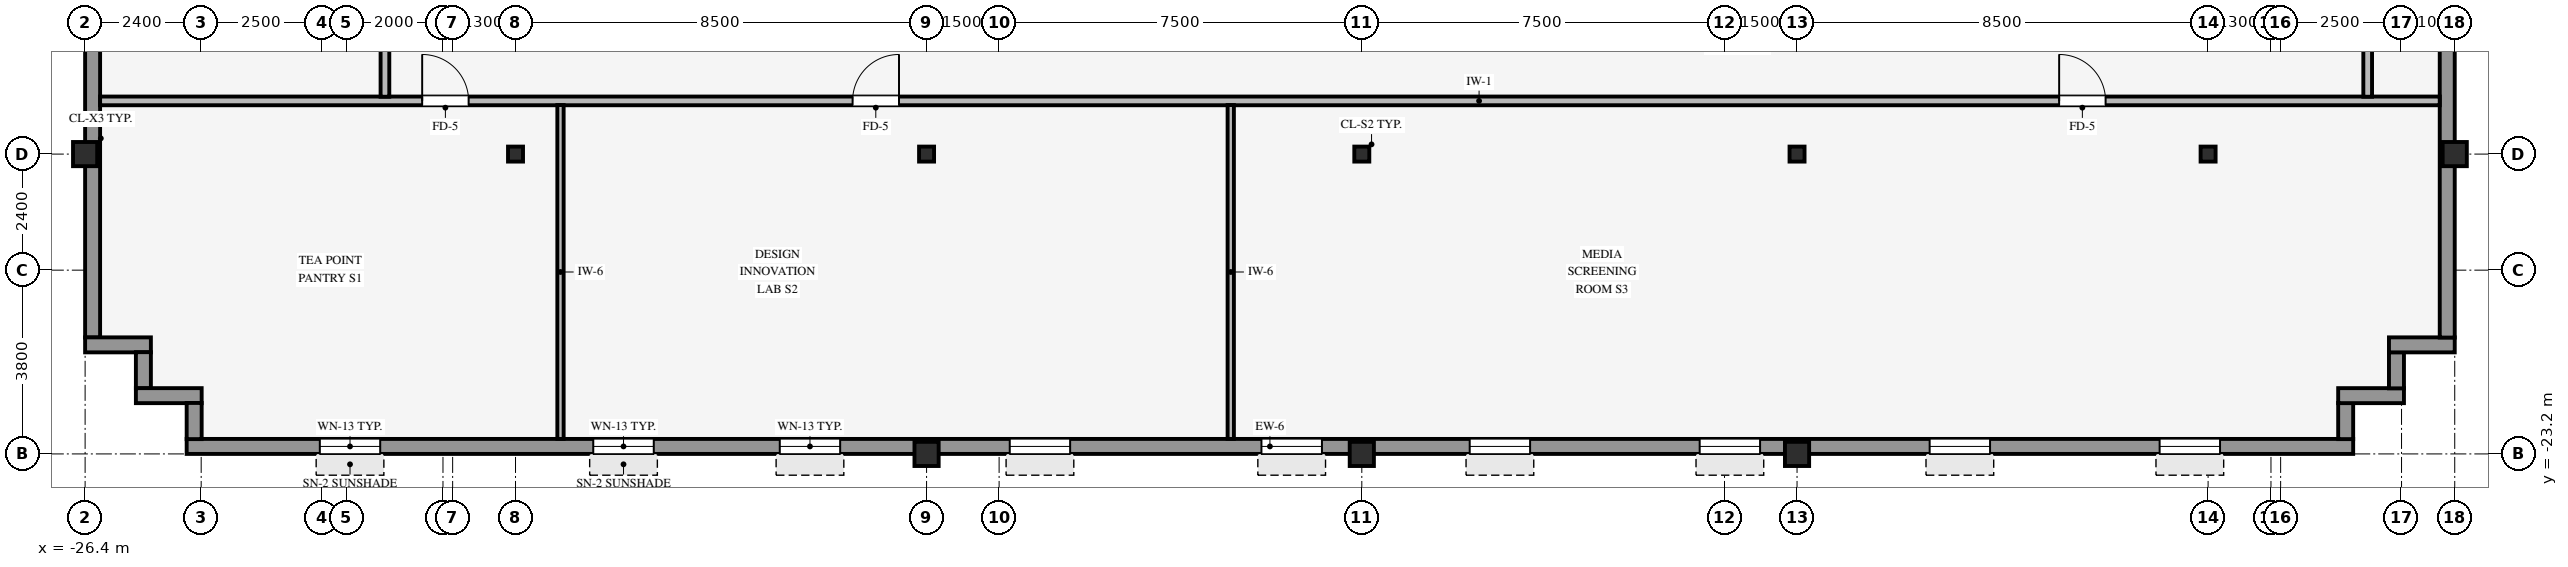
"""IFC4 building model, lengths in metres.
Left out: names, types, materials, properties, quantities, classifications, styles, units other than length and angle.
Written with IfcOpenShell. Run it as: python <this file> out.ifc"""

import sys

from ifc_helpers import new_model, si_unit, direction, frame, frame_2d, origin, origin_2d, place, context, subcontext, project, spatial, rectangle, hollow_rectangle, i_section, extrude, source, transform, mapped, element, fill, save


model = new_model("IFC4")
c1 = context("Model", 3, precision=1e-05, world=origin(), true_north=direction((0.0, 1.0)))
c2 = subcontext(c1, "Body", "Model", "MODEL_VIEW")
j1 = project(units=[si_unit("LENGTHUNIT", "METRE"), si_unit("PLANEANGLEUNIT", "RADIAN")], contexts=[c1])
p1 = place(None, origin())
s1 = spatial("IfcSite", under=j1, at=p1, CompositionType="ELEMENT")
p2 = place(p1, origin())
s2 = spatial("IfcBuilding", under=s1, at=p2, CompositionType="ELEMENT")
p3 = place(p2, frame((0.0, 0.0, 201.85)))
s3 = spatial("IfcBuildingStorey", under=s2, at=p3, CompositionType="ELEMENT", Elevation=201.85)
for number, where, z_axis, x_axis in (
    (1, (-26.4, -17.0, 0.0), (0.0, 0.0, 1.0), (1.0, 0.0, 0.0)),
    (2, (22.6, -17.0, 0.0), (0.0, 0.0, 1.0), (1.0, 0.0, 0.0)),
    (3, (-9.0, -23.2, 0.0), (0.0, 0.0, 1.0), (1.0, 0.0, 0.0)),
    (4, (0.0, -23.2, 0.0), (0.0, 0.0, 1.0), (1.0, 0.0, 0.0)),
    (5, (9.0, -23.2, 0.0), (0.0, 0.0, 1.0), (1.0, 0.0, 0.0)),
):
    element("IfcColumn", number, at=place(p3, frame(where, z_axis=z_axis, x_axis=x_axis)), inside=s3, PredefinedType="COLUMN", context=c2, shape_type="SweptSolid", body=[
        extrude(hollow_rectangle(XDim=0.5, YDim=0.5, WallThickness=0.032, InnerFilletRadius=0.032, OuterFilletRadius=0.064, at=origin_2d()), origin(), (0.0, 0.0, 1.0), 3.37),
    ])
for number, where, z_axis, x_axis in (
    (6, (0.0, -17.0, 0.0), (0.0, 0.0, 1.0), (1.0, 0.0, 0.0)),
    (7, (-17.5, -17.0, 0.0), (0.0, 0.0, 1.0), (1.0, 0.0, 0.0)),
    (8, (-9.0, -17.0, 0.0), (0.0, 0.0, 1.0), (1.0, 0.0, 0.0)),
    (9, (9.0, -17.0, 0.0), (0.0, 0.0, 1.0), (1.0, 0.0, 0.0)),
    (10, (17.5, -17.0, 0.0), (0.0, 0.0, 1.0), (1.0, 0.0, 0.0)),
):
    element("IfcColumn", number, at=place(p3, frame(where, z_axis=z_axis, x_axis=x_axis)), inside=s3, PredefinedType="COLUMN", context=c2, shape_type="SweptSolid", body=[
        extrude(i_section(OverallWidth=0.31, OverallDepth=0.31, WebThickness=0.015, FlangeThickness=0.015, FilletRadius=0.015, at=origin_2d()), origin(), (0.0, 0.0, 1.0), 3.37),
    ])
p4 = place(p3, frame((-24.3, -23.045, 0.0), z_axis=(0.0, 0.0, 1.0), x_axis=(1.0, 0.0, 0.0)))
e11 = element("IfcWall", 11, at=p4, inside=s3, PredefinedType="STANDARD", context=c2, shape_type="SweptSolid", body=[
    extrude(rectangle(XDim=44.8, YDim=0.31, at=frame_2d((22.4, 0.0))), origin(), (0.0, 0.0, 1.0), 2.705),
])
p5 = place(p4, frame((2.753, 0.0, 0.8)))
e12 = element("IfcOpeningElement", 12, at=p5, cuts=e11, PredefinedType="OPENING", context=c2, shape_type="SweptSolid", body=[
    extrude(rectangle(XDim=1.25, YDim=1.52, at=frame_2d((0.625, 0.76))), frame((0.0, 0.165, 0.0), z_axis=(0.0, -1.0, 0.0), x_axis=(1.0, 0.0, 0.0)), (0.0, 0.0, 1.0), 0.33),
])
p6 = place(p4, frame((8.408, 0.0, 0.8)))
e13 = element("IfcOpeningElement", 13, at=p6, cuts=e11, PredefinedType="OPENING", context=c2, shape_type="SweptSolid", body=[
    extrude(rectangle(XDim=1.25, YDim=1.52, at=frame_2d((0.625, 0.76))), frame((0.0, 0.165, 0.0), z_axis=(0.0, -1.0, 0.0), x_axis=(1.0, 0.0, 0.0)), (0.0, 0.0, 1.0), 0.33),
])
p7 = place(p4, frame((12.264, 0.0, 0.8)))
e14 = element("IfcOpeningElement", 14, at=p7, cuts=e11, PredefinedType="OPENING", context=c2, shape_type="SweptSolid", body=[
    extrude(rectangle(XDim=1.25, YDim=1.52, at=frame_2d((0.625, 0.76))), frame((0.0, 0.165, 0.0), z_axis=(0.0, -1.0, 0.0), x_axis=(1.0, 0.0, 0.0)), (0.0, 0.0, 1.0), 0.33),
])
p8 = place(p4, frame((17.019, 0.0, 0.8)))
e15 = element("IfcOpeningElement", 15, at=p8, cuts=e11, PredefinedType="OPENING", context=c2, shape_type="SweptSolid", body=[
    extrude(rectangle(XDim=1.25, YDim=1.52, at=frame_2d((0.625, 0.76))), frame((0.0, 0.165, 0.0), z_axis=(0.0, -1.0, 0.0), x_axis=(1.0, 0.0, 0.0)), (0.0, 0.0, 1.0), 0.33),
])
p9 = place(p4, frame((22.225, 0.0, 0.8)))
e16 = element("IfcOpeningElement", 16, at=p9, cuts=e11, PredefinedType="OPENING", context=c2, shape_type="SweptSolid", body=[
    extrude(rectangle(XDim=1.25, YDim=1.52, at=frame_2d((0.625, 0.76))), frame((0.0, 0.165, 0.0), z_axis=(0.0, -1.0, 0.0), x_axis=(1.0, 0.0, 0.0)), (0.0, 0.0, 1.0), 0.33),
])
p10 = place(p4, frame((26.531, 0.0, 0.8)))
e17 = element("IfcOpeningElement", 17, at=p10, cuts=e11, PredefinedType="OPENING", context=c2, shape_type="SweptSolid", body=[
    extrude(rectangle(XDim=1.25, YDim=1.52, at=frame_2d((0.625, 0.76))), frame((0.0, 0.165, 0.0), z_axis=(0.0, -1.0, 0.0), x_axis=(1.0, 0.0, 0.0)), (0.0, 0.0, 1.0), 0.33),
])
p11 = place(p4, frame((31.286, 0.0, 0.8)))
e18 = element("IfcOpeningElement", 18, at=p11, cuts=e11, PredefinedType="OPENING", context=c2, shape_type="SweptSolid", body=[
    extrude(rectangle(XDim=1.25, YDim=1.52, at=frame_2d((0.625, 0.76))), frame((0.0, 0.165, 0.0), z_axis=(0.0, -1.0, 0.0), x_axis=(1.0, 0.0, 0.0)), (0.0, 0.0, 1.0), 0.33),
])
p12 = place(p4, frame((36.042, 0.0, 0.8)))
e19 = element("IfcOpeningElement", 19, at=p12, cuts=e11, PredefinedType="OPENING", context=c2, shape_type="SweptSolid", body=[
    extrude(rectangle(XDim=1.25, YDim=1.52, at=frame_2d((0.625, 0.76))), frame((0.0, 0.165, 0.0), z_axis=(0.0, -1.0, 0.0), x_axis=(1.0, 0.0, 0.0)), (0.0, 0.0, 1.0), 0.33),
])
p13 = place(p4, frame((40.797, 0.0, 0.8)))
e20 = element("IfcOpeningElement", 20, at=p13, cuts=e11, PredefinedType="OPENING", context=c2, shape_type="SweptSolid", body=[
    extrude(rectangle(XDim=1.25, YDim=1.52, at=frame_2d((0.625, 0.76))), frame((0.0, 0.165, 0.0), z_axis=(0.0, -1.0, 0.0), x_axis=(1.0, 0.0, 0.0)), (0.0, 0.0, 1.0), 0.33),
])
p14 = place(p3, frame((20.345, -22.894, 0.0), z_axis=(0.0, 0.0, 1.0), x_axis=(0.0, 1.0, 0.0)))
e21 = element("IfcWall", 21, at=p14, inside=s3, PredefinedType="STANDARD", context=c2, shape_type="SweptSolid", body=[
    extrude(rectangle(XDim=0.748, YDim=0.31, at=frame_2d((0.374, 0.0))), origin(), (0.0, 0.0, 1.0), 3.36),
])
p15 = place(p3, frame((20.19, -21.995, 0.0), z_axis=(0.0, 0.0, 1.0), x_axis=(1.0, 0.0, 0.0)))
e22 = element("IfcWall", 22, at=p15, inside=s3, PredefinedType="STANDARD", context=c2, shape_type="SweptSolid", body=[
    extrude(rectangle(XDim=1.36, YDim=0.31, at=frame_2d((0.68, 0.0))), origin(), (0.0, 0.0, 1.0), 3.36),
])
p16 = place(p3, frame((21.395, -21.844, 0.0), z_axis=(0.0, 0.0, 1.0), x_axis=(0.0, 1.0, 0.0)))
e23 = element("IfcWall", 23, at=p16, inside=s3, PredefinedType="STANDARD", context=c2, shape_type="SweptSolid", body=[
    extrude(rectangle(XDim=0.748, YDim=0.31, at=frame_2d((0.374, 0.0))), origin(), (0.0, 0.0, 1.0), 3.36),
])
p17 = place(p3, frame((21.24, -20.945, 0.0), z_axis=(0.0, 0.0, 1.0), x_axis=(1.0, 0.0, 0.0)))
e24 = element("IfcWall", 24, at=p17, inside=s3, PredefinedType="STANDARD", context=c2, shape_type="SweptSolid", body=[
    extrude(rectangle(XDim=1.36, YDim=0.31, at=frame_2d((0.68, 0.0))), origin(), (0.0, 0.0, 1.0), 3.36),
])
p18 = place(p3, frame((22.445, -20.794, 0.0), z_axis=(0.0, 0.0, 1.0), x_axis=(0.0, 1.0, 0.0)))
e25 = element("IfcWall", 25, at=p18, inside=s3, PredefinedType="STANDARD", context=c2, shape_type="SweptSolid", body=[
    extrude(rectangle(XDim=37.788, YDim=0.31, at=frame_2d((18.894, 0.0))), origin(), (0.0, 0.0, 1.0), 2.705),
])
p19 = place(p18, frame((16.444, 0.0, 0.0), z_axis=(0.0, 0.0, 1.0), x_axis=(-1.0, 0.0, 0.0)))
e26 = element("IfcOpeningElement", 26, at=p19, cuts=e25, PredefinedType="OPENING", context=c2, shape_type="SweptSolid", body=[
    extrude(rectangle(XDim=1.05, YDim=2.1, at=frame_2d((0.525, 1.05))), frame((0.0, 0.165, 0.0), z_axis=(0.0, -1.0, 0.0), x_axis=(1.0, 0.0, 0.0)), (0.0, 0.0, 1.0), 0.33),
])
p20 = place(p18, frame((7.644, 0.0, 0.8)))
e27 = element("IfcOpeningElement", 27, at=p20, cuts=e25, PredefinedType="OPENING", context=c2, shape_type="SweptSolid", body=[
    extrude(rectangle(XDim=2.05, YDim=1.52, at=frame_2d((1.025, 0.76))), frame((0.0, 0.165, 0.0), z_axis=(0.0, -1.0, 0.0), x_axis=(1.0, 0.0, 0.0)), (0.0, 0.0, 1.0), 0.33),
])
p21 = place(p18, frame((12.756, 0.0, 0.8)))
e28 = element("IfcOpeningElement", 28, at=p21, cuts=e25, PredefinedType="OPENING", context=c2, shape_type="SweptSolid", body=[
    extrude(rectangle(XDim=2.05, YDim=1.52, at=frame_2d((1.025, 0.76))), frame((0.0, 0.165, 0.0), z_axis=(0.0, -1.0, 0.0), x_axis=(1.0, 0.0, 0.0)), (0.0, 0.0, 1.0), 0.33),
])
p22 = place(p18, frame((17.869, 0.0, 0.8)))
e29 = element("IfcOpeningElement", 29, at=p22, cuts=e25, PredefinedType="OPENING", context=c2, shape_type="SweptSolid", body=[
    extrude(rectangle(XDim=2.05, YDim=1.52, at=frame_2d((1.025, 0.76))), frame((0.0, 0.165, 0.0), z_axis=(0.0, -1.0, 0.0), x_axis=(1.0, 0.0, 0.0)), (0.0, 0.0, 1.0), 0.33),
])
p23 = place(p18, frame((22.982, 0.0, 0.8)))
e30 = element("IfcOpeningElement", 30, at=p23, cuts=e25, PredefinedType="OPENING", context=c2, shape_type="SweptSolid", body=[
    extrude(rectangle(XDim=2.05, YDim=1.52, at=frame_2d((1.025, 0.76))), frame((0.0, 0.165, 0.0), z_axis=(0.0, -1.0, 0.0), x_axis=(1.0, 0.0, 0.0)), (0.0, 0.0, 1.0), 0.33),
])
p24 = place(p18, frame((27.194, 0.0, 0.8)))
e31 = element("IfcOpeningElement", 31, at=p24, cuts=e25, PredefinedType="OPENING", context=c2, shape_type="SweptSolid", body=[
    extrude(rectangle(XDim=2.05, YDim=1.52, at=frame_2d((1.025, 0.76))), frame((0.0, 0.165, 0.0), z_axis=(0.0, -1.0, 0.0), x_axis=(1.0, 0.0, 0.0)), (0.0, 0.0, 1.0), 0.33),
])
p25 = place(p18, frame((33.207, 0.0, 0.8)))
e32 = element("IfcOpeningElement", 32, at=p25, cuts=e25, PredefinedType="OPENING", context=c2, shape_type="SweptSolid", body=[
    extrude(rectangle(XDim=2.05, YDim=1.52, at=frame_2d((1.025, 0.76))), frame((0.0, 0.165, 0.0), z_axis=(0.0, -1.0, 0.0), x_axis=(1.0, 0.0, 0.0)), (0.0, 0.0, 1.0), 0.33),
])
p26 = place(p3, frame((-26.245, -20.794, 0.0), z_axis=(0.0, 0.0, 1.0), x_axis=(0.0, 1.0, 0.0)))
e33 = element("IfcWall", 33, at=p26, inside=s3, PredefinedType="STANDARD", context=c2, shape_type="SweptSolid", body=[
    extrude(rectangle(XDim=37.788, YDim=0.31, at=frame_2d((18.894, 0.0))), origin(), (0.0, 0.0, 1.0), 2.705),
])
p27 = place(p26, frame((7.644, 0.0, 0.8)))
e34 = element("IfcOpeningElement", 34, at=p27, cuts=e33, PredefinedType="OPENING", context=c2, shape_type="SweptSolid", body=[
    extrude(rectangle(XDim=2.05, YDim=1.52, at=frame_2d((1.025, 0.76))), frame((0.0, 0.165, 0.0), z_axis=(0.0, -1.0, 0.0), x_axis=(1.0, 0.0, 0.0)), (0.0, 0.0, 1.0), 0.33),
])
p28 = place(p26, frame((13.206, 0.0, 0.8)))
e35 = element("IfcOpeningElement", 35, at=p28, cuts=e33, PredefinedType="OPENING", context=c2, shape_type="SweptSolid", body=[
    extrude(rectangle(XDim=2.05, YDim=1.52, at=frame_2d((1.025, 0.76))), frame((0.0, 0.165, 0.0), z_axis=(0.0, -1.0, 0.0), x_axis=(1.0, 0.0, 0.0)), (0.0, 0.0, 1.0), 0.33),
])
p29 = place(p26, frame((17.869, 0.0, 0.8)))
e36 = element("IfcOpeningElement", 36, at=p29, cuts=e33, PredefinedType="OPENING", context=c2, shape_type="SweptSolid", body=[
    extrude(rectangle(XDim=2.05, YDim=1.52, at=frame_2d((1.025, 0.76))), frame((0.0, 0.165, 0.0), z_axis=(0.0, -1.0, 0.0), x_axis=(1.0, 0.0, 0.0)), (0.0, 0.0, 1.0), 0.33),
])
p30 = place(p26, frame((22.982, 0.0, 0.8)))
e37 = element("IfcOpeningElement", 37, at=p30, cuts=e33, PredefinedType="OPENING", context=c2, shape_type="SweptSolid", body=[
    extrude(rectangle(XDim=2.05, YDim=1.52, at=frame_2d((1.025, 0.76))), frame((0.0, 0.165, 0.0), z_axis=(0.0, -1.0, 0.0), x_axis=(1.0, 0.0, 0.0)), (0.0, 0.0, 1.0), 0.33),
])
p31 = place(p26, frame((33.207, 0.0, 0.8)))
e38 = element("IfcOpeningElement", 38, at=p31, cuts=e33, PredefinedType="OPENING", context=c2, shape_type="SweptSolid", body=[
    extrude(rectangle(XDim=2.05, YDim=1.52, at=frame_2d((1.025, 0.76))), frame((0.0, 0.165, 0.0), z_axis=(0.0, -1.0, 0.0), x_axis=(1.0, 0.0, 0.0)), (0.0, 0.0, 1.0), 0.33),
])
p32 = place(p3, frame((-26.4, -20.945, 0.0), z_axis=(0.0, 0.0, 1.0), x_axis=(1.0, 0.0, 0.0)))
e39 = element("IfcWall", 39, at=p32, inside=s3, PredefinedType="STANDARD", context=c2, shape_type="SweptSolid", body=[
    extrude(rectangle(XDim=1.36, YDim=0.31, at=frame_2d((0.68, 0.0))), origin(), (0.0, 0.0, 1.0), 3.36),
])
p33 = place(p3, frame((-25.195, -21.844, 0.0), z_axis=(0.0, 0.0, 1.0), x_axis=(0.0, 1.0, 0.0)))
e40 = element("IfcWall", 40, at=p33, inside=s3, PredefinedType="STANDARD", context=c2, shape_type="SweptSolid", body=[
    extrude(rectangle(XDim=0.748, YDim=0.31, at=frame_2d((0.374, 0.0))), origin(), (0.0, 0.0, 1.0), 3.36),
])
p34 = place(p3, frame((-25.35, -21.995, 0.0), z_axis=(0.0, 0.0, 1.0), x_axis=(1.0, 0.0, 0.0)))
e41 = element("IfcWall", 41, at=p34, inside=s3, PredefinedType="STANDARD", context=c2, shape_type="SweptSolid", body=[
    extrude(rectangle(XDim=1.36, YDim=0.31, at=frame_2d((0.68, 0.0))), origin(), (0.0, 0.0, 1.0), 3.36),
])
p35 = place(p3, frame((-24.145, -22.894, 0.0), z_axis=(0.0, 0.0, 1.0), x_axis=(0.0, 1.0, 0.0)))
e42 = element("IfcWall", 42, at=p35, inside=s3, PredefinedType="STANDARD", context=c2, shape_type="SweptSolid", body=[
    extrude(rectangle(XDim=0.748, YDim=0.31, at=frame_2d((0.374, 0.0))), origin(), (0.0, 0.0, 1.0), 3.36),
])
p36 = place(p3, frame((-26.09, -15.9, 0.0), z_axis=(0.0, 0.0, 1.0), x_axis=(1.0, 0.0, 0.0)))
e43 = element("IfcWall", 43, at=p36, inside=s3, PredefinedType="PARTITIONING", context=c2, shape_type="SweptSolid", body=[
    extrude(rectangle(XDim=48.38, YDim=0.18, at=frame_2d((24.19, 0.0))), origin(), (0.0, 0.0, 1.0), 3.36),
])
p37 = place(p36, frame((15.56, 0.0, 0.0)))
e44 = element("IfcOpeningElement", 44, at=p37, cuts=e43, PredefinedType="OPENING", context=c2, shape_type="SweptSolid", body=[
    extrude(rectangle(XDim=0.96, YDim=2.1, at=frame_2d((0.48, 1.05))), frame((0.0, 0.1, 0.0), z_axis=(0.0, -1.0, 0.0), x_axis=(1.0, 0.0, 0.0)), (0.0, 0.0, 1.0), 0.2),
])
p38 = place(p36, frame((40.51, 0.0, 0.0)))
e45 = element("IfcOpeningElement", 45, at=p38, cuts=e43, PredefinedType="OPENING", context=c2, shape_type="SweptSolid", body=[
    extrude(rectangle(XDim=0.96, YDim=2.1, at=frame_2d((0.48, 1.05))), frame((0.0, 0.1, 0.0), z_axis=(0.0, -1.0, 0.0), x_axis=(1.0, 0.0, 0.0)), (0.0, 0.0, 1.0), 0.2),
])
p39 = place(p36, frame((6.66, 0.0, 0.0)))
e46 = element("IfcOpeningElement", 46, at=p39, cuts=e43, PredefinedType="OPENING", context=c2, shape_type="SweptSolid", body=[
    extrude(rectangle(XDim=0.96, YDim=2.1, at=frame_2d((0.48, 1.05))), frame((0.0, 0.1, 0.0), z_axis=(0.0, -1.0, 0.0), x_axis=(1.0, 0.0, 0.0)), (0.0, 0.0, 1.0), 0.2),
])
p40 = place(p3, frame((-20.2, -15.814, 0.0), z_axis=(0.0, 0.0, 1.0), x_axis=(0.0, 1.0, 0.0)))
e47 = element("IfcWall", 47, at=p40, inside=s3, PredefinedType="PARTITIONING", context=c2, shape_type="SweptSolid", body=[
    extrude(rectangle(XDim=31.628, YDim=0.18, at=frame_2d((15.814, 0.0))), origin(), (0.0, 0.0, 1.0), 3.36),
])
p41 = place(p40, frame((11.434, 0.0, 0.0)))
e48 = element("IfcOpeningElement", 48, at=p41, cuts=e47, PredefinedType="OPENING", context=c2, shape_type="SweptSolid", body=[
    extrude(rectangle(XDim=0.96, YDim=2.1, at=frame_2d((0.48, 1.05))), frame((0.0, 0.1, 0.0), z_axis=(0.0, -1.0, 0.0), x_axis=(1.0, 0.0, 0.0)), (0.0, 0.0, 1.0), 0.2),
])
p42 = place(p40, frame((19.634, 0.0, 0.0)))
e49 = element("IfcOpeningElement", 49, at=p42, cuts=e47, PredefinedType="OPENING", context=c2, shape_type="SweptSolid", body=[
    extrude(rectangle(XDim=0.96, YDim=2.1, at=frame_2d((0.48, 1.05))), frame((0.0, 0.1, 0.0), z_axis=(0.0, -1.0, 0.0), x_axis=(1.0, 0.0, 0.0)), (0.0, 0.0, 1.0), 0.2),
])
p43 = place(p40, frame((4.484, 0.0, 0.0)))
e50 = element("IfcOpeningElement", 50, at=p43, cuts=e47, PredefinedType="OPENING", context=c2, shape_type="SweptSolid", body=[
    extrude(rectangle(XDim=0.96, YDim=2.1, at=frame_2d((0.48, 1.05))), frame((0.0, 0.1, 0.0), z_axis=(0.0, -1.0, 0.0), x_axis=(1.0, 0.0, 0.0)), (0.0, 0.0, 1.0), 0.2),
])
p44 = place(p40, frame((26.184, 0.0, 0.0)))
e51 = element("IfcOpeningElement", 51, at=p44, cuts=e47, PredefinedType="OPENING", context=c2, shape_type="SweptSolid", body=[
    extrude(rectangle(XDim=0.96, YDim=2.1, at=frame_2d((0.48, 1.05))), frame((0.0, 0.1, 0.0), z_axis=(0.0, -1.0, 0.0), x_axis=(1.0, 0.0, 0.0)), (0.0, 0.0, 1.0), 0.2),
])
for number, where, z_axis, x_axis in (
    (52, (-16.57, -22.89, 0.0), (0.0, 0.0, 1.0), (0.0, 1.0, 0.0)),
    (53, (-2.71, -22.89, 0.0), (0.0, 0.0, 1.0), (0.0, 1.0, 0.0)),
):
    element("IfcWall", number, at=place(p3, frame(where, z_axis=z_axis, x_axis=x_axis)), inside=s3, PredefinedType="PARTITIONING", context=c2, shape_type="SweptSolid", body=[
        extrude(rectangle(XDim=6.904, YDim=0.13, at=frame_2d((3.452, 0.0))), origin(), (0.0, 0.0, 1.0), 3.36),
    ])
p45 = place(p3, frame((20.8, -15.814, 0.0), z_axis=(0.0, 0.0, 1.0), x_axis=(0.0, 1.0, 0.0)))
e54 = element("IfcWall", 54, at=p45, inside=s3, PredefinedType="PARTITIONING", context=c2, shape_type="SweptSolid", body=[
    extrude(rectangle(XDim=2.228, YDim=0.18, at=frame_2d((1.114, 0.0))), origin(), (0.0, 0.0, 1.0), 3.36),
])
m1 = source(origin(), c2, "Body", "SweptSolid", [
    extrude(rectangle(XDim=1.25, YDim=1.52, at=frame_2d((0.625, 0.76))), frame((0.0, 0.03, 0.0), z_axis=(0.0, -1.0, 0.0), x_axis=(1.0, 0.0, 0.0)), (0.0, 0.0, 1.0), 0.06),
])
p46 = place(p5, origin())
e55 = element("IfcWindow", 55, at=p46, inside=s3, PartitioningType="SINGLE_PANEL", PredefinedType="WINDOW", context=c2, shape_type="MappedRepresentation", body=[
    mapped(m1, transform((0.0, 0.0, 0.0), scale=1.0)),
])
fill(e12, e55)
p47 = place(p6, origin())
e56 = element("IfcWindow", 56, at=p47, inside=s3, PartitioningType="SINGLE_PANEL", PredefinedType="WINDOW", context=c2, shape_type="MappedRepresentation", body=[
    mapped(m1, transform((0.0, 0.0, 0.0), scale=1.0)),
])
fill(e13, e56)
p48 = place(p7, origin())
e57 = element("IfcWindow", 57, at=p48, inside=s3, PartitioningType="SINGLE_PANEL", PredefinedType="WINDOW", context=c2, shape_type="MappedRepresentation", body=[
    mapped(m1, transform((0.0, 0.0, 0.0), scale=1.0)),
])
fill(e14, e57)
p49 = place(p8, origin())
e58 = element("IfcWindow", 58, at=p49, inside=s3, PartitioningType="SINGLE_PANEL", PredefinedType="WINDOW", context=c2, shape_type="MappedRepresentation", body=[
    mapped(m1, transform((0.0, 0.0, 0.0), scale=1.0)),
])
fill(e15, e58)
p50 = place(p9, origin())
e59 = element("IfcWindow", 59, at=p50, inside=s3, PartitioningType="SINGLE_PANEL", PredefinedType="WINDOW", context=c2, shape_type="MappedRepresentation", body=[
    mapped(m1, transform((0.0, 0.0, 0.0), scale=1.0)),
])
fill(e16, e59)
p51 = place(p10, origin())
e60 = element("IfcWindow", 60, at=p51, inside=s3, PartitioningType="SINGLE_PANEL", PredefinedType="WINDOW", context=c2, shape_type="MappedRepresentation", body=[
    mapped(m1, transform((0.0, 0.0, 0.0), scale=1.0)),
])
fill(e17, e60)
p52 = place(p11, origin())
e61 = element("IfcWindow", 61, at=p52, inside=s3, PartitioningType="SINGLE_PANEL", PredefinedType="WINDOW", context=c2, shape_type="MappedRepresentation", body=[
    mapped(m1, transform((0.0, 0.0, 0.0), scale=1.0)),
])
fill(e18, e61)
p53 = place(p12, origin())
e62 = element("IfcWindow", 62, at=p53, inside=s3, PartitioningType="SINGLE_PANEL", PredefinedType="WINDOW", context=c2, shape_type="MappedRepresentation", body=[
    mapped(m1, transform((0.0, 0.0, 0.0), scale=1.0)),
])
fill(e19, e62)
p54 = place(p13, origin())
e63 = element("IfcWindow", 63, at=p54, inside=s3, PartitioningType="SINGLE_PANEL", PredefinedType="WINDOW", context=c2, shape_type="MappedRepresentation", body=[
    mapped(m1, transform((0.0, 0.0, 0.0), scale=1.0)),
])
fill(e20, e63)
m2 = source(origin(), c2, "Body", "SweptSolid", [
    extrude(rectangle(XDim=0.96, YDim=2.1, at=frame_2d((0.48, 1.05))), frame((0.0, 0.025, 0.0), z_axis=(0.0, -1.0, 0.0), x_axis=(1.0, 0.0, 0.0)), (0.0, 0.0, 1.0), 0.05),
])
p55 = place(p37, origin())
e64 = element("IfcDoor", 64, at=p55, inside=s3, OperationType="SINGLE_SWING_RIGHT", PredefinedType="DOOR", context=c2, shape_type="MappedRepresentation", body=[
    mapped(m2, transform((0.0, 0.0, 0.0), scale=1.0)),
])
fill(e44, e64)
p56 = place(p38, origin())
e65 = element("IfcDoor", 65, at=p56, inside=s3, OperationType="SINGLE_SWING_LEFT", PredefinedType="DOOR", context=c2, shape_type="MappedRepresentation", body=[
    mapped(m2, transform((0.0, 0.0, 0.0), scale=1.0)),
])
fill(e45, e65)
p57 = place(p39, origin())
e66 = element("IfcDoor", 66, at=p57, inside=s3, OperationType="SINGLE_SWING_LEFT", PredefinedType="DOOR", context=c2, shape_type="MappedRepresentation", body=[
    mapped(m2, transform((0.0, 0.0, 0.0), scale=1.0)),
])
fill(e46, e66)
save(model, sys.argv[1])
